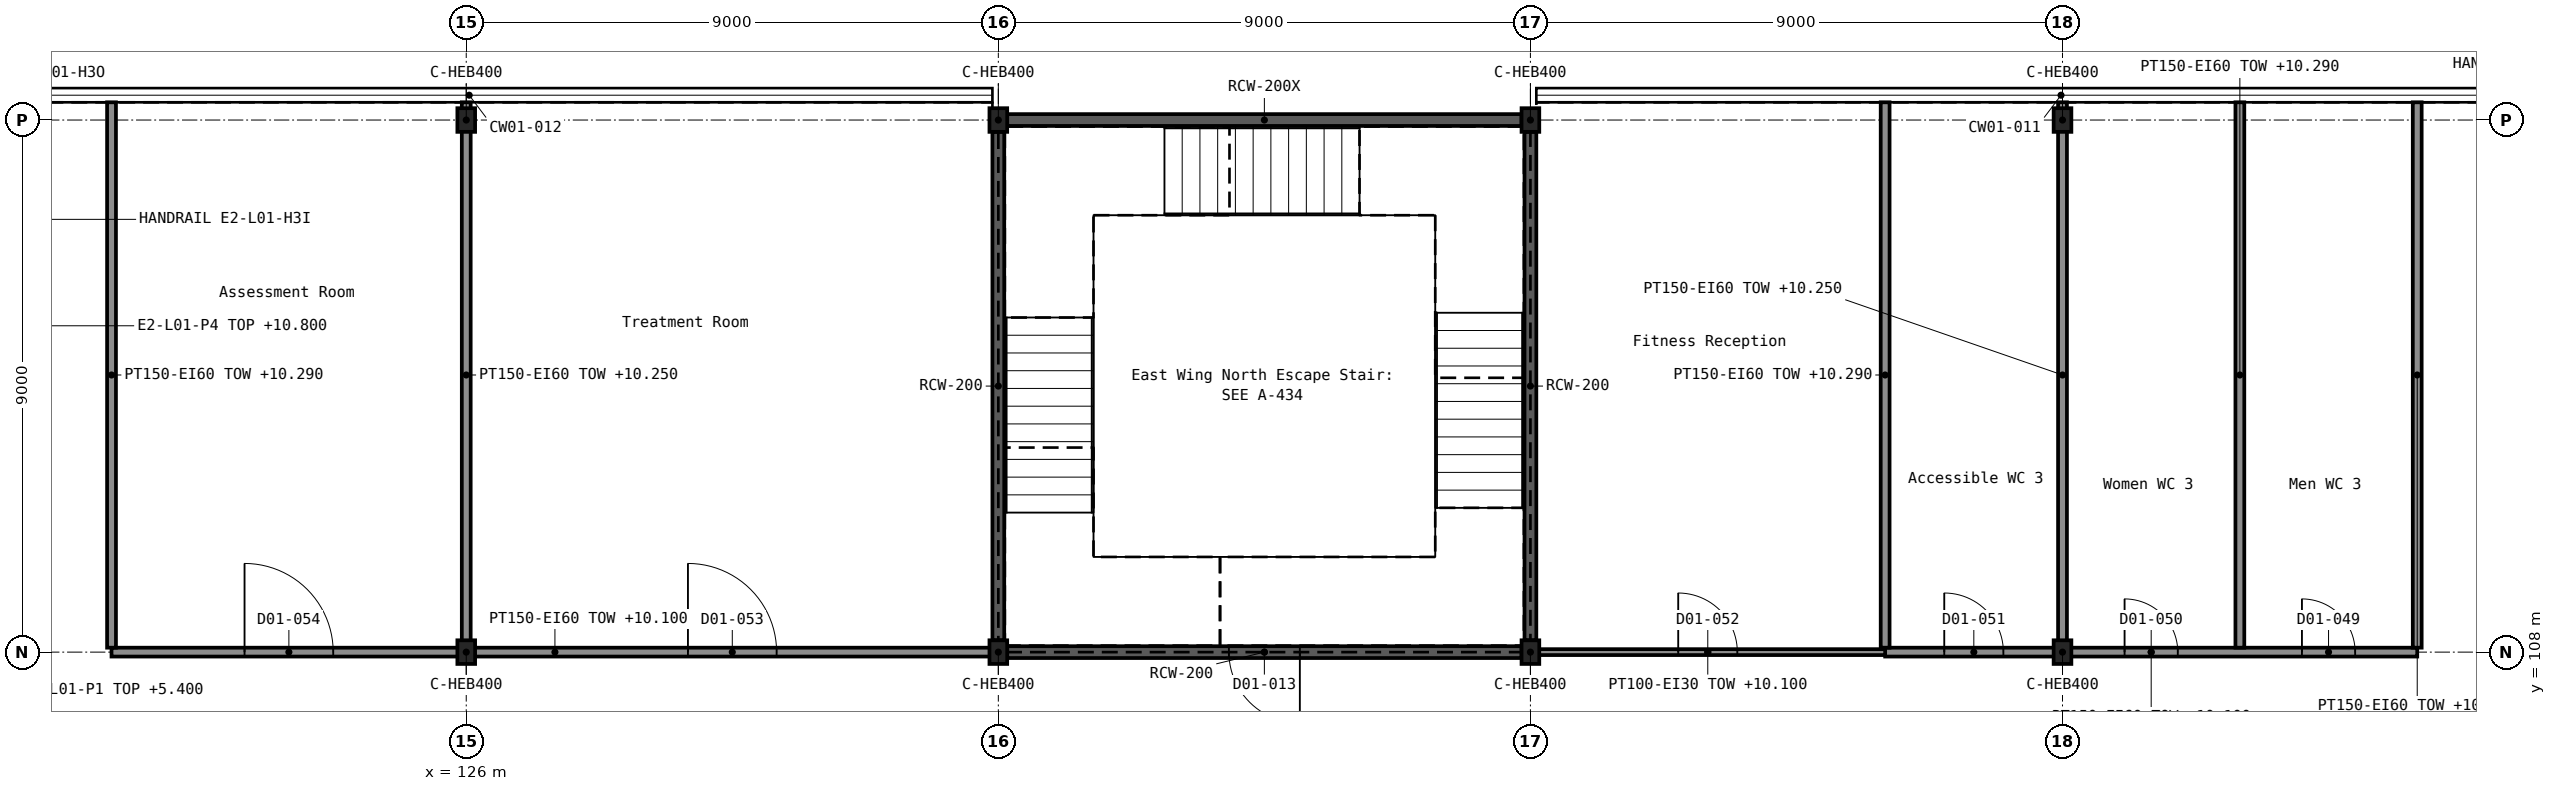
"""IFC4 building model, lengths in metres.
Left out: names, types, materials, properties, quantities, classifications, styles, units other than length and angle.
Written with IfcOpenShell. Run it as: python <this file> out.ifc"""

import sys

from ifc_helpers import new_model, si_unit, direction, frame, frame_2d, origin, origin_2d, place, context, subcontext, project, spatial, rectangle, i_section, extrude, element, fill, save


model = new_model("IFC4")
c1 = context("Model", 3, precision=1e-05, world=origin(), true_north=direction((0.0, 1.0)))
c2 = subcontext(c1, "Body", "Model", "MODEL_VIEW")
j1 = project(units=[si_unit("LENGTHUNIT", "METRE"), si_unit("PLANEANGLEUNIT", "RADIAN")], contexts=[c1])
p1 = place(None, origin())
s1 = spatial("IfcSite", under=j1, at=p1, CompositionType="ELEMENT")
p2 = place(p1, origin())
s2 = spatial("IfcBuilding", under=s1, at=p2, CompositionType="ELEMENT")
p3 = place(p2, frame((0.0, 0.0, 5.4)))
s3 = spatial("IfcBuildingStorey", under=s2, at=p3, CompositionType="ELEMENT", Elevation=5.4)
for number, where, z_axis, x_axis in (
    (1, (126.0, 108.0, 0.0), (0.0, 0.0, 1.0), (1.0, 0.0, 0.0)),
    (2, (135.0, 108.0, 0.0), (0.0, 0.0, 1.0), (1.0, 0.0, 0.0)),
    (3, (144.0, 108.0, 0.0), (0.0, 0.0, 1.0), (1.0, 0.0, 0.0)),
    (4, (153.0, 108.0, 0.0), (0.0, 0.0, 1.0), (1.0, 0.0, 0.0)),
    (5, (126.0, 117.0, 0.0), (0.0, 0.0, 1.0), (1.0, 0.0, 0.0)),
    (6, (135.0, 117.0, 0.0), (0.0, 0.0, 1.0), (1.0, 0.0, 0.0)),
    (7, (144.0, 117.0, 0.0), (0.0, 0.0, 1.0), (1.0, 0.0, 0.0)),
    (8, (153.0, 117.0, 0.0), (0.0, 0.0, 1.0), (1.0, 0.0, 0.0)),
):
    element("IfcColumn", number, at=place(p3, frame(where, z_axis=z_axis, x_axis=x_axis)), inside=s3, PredefinedType="COLUMN", context=c2, shape_type="SweptSolid", body=[
        extrude(i_section(OverallWidth=0.3, OverallDepth=0.4, WebThickness=0.013, FlangeThickness=0.024, FilletRadius=0.027, at=origin_2d()), origin(), (0.0, 0.0, 1.0), 5.4),
    ])
p4 = place(p3, frame((135.15, 108.0, 0.0), z_axis=(0.0, 0.0, 1.0), x_axis=(1.0, 0.0, 0.0)))
e9 = element("IfcWall", 9, at=p4, inside=s3, PredefinedType="SHEAR", context=c2, shape_type="SweptSolid", body=[
    extrude(rectangle(XDim=8.7, YDim=0.2, at=frame_2d((4.35, 0.0))), origin(), (0.0, 0.0, 1.0), 5.4),
])
p5 = place(p4, frame((3.75, 0.0, 0.0)))
e10 = element("IfcOpeningElement", 10, at=p5, cuts=e9, PredefinedType="OPENING", context=c2, shape_type="SweptSolid", body=[
    extrude(rectangle(XDim=1.2, YDim=2.1, at=frame_2d((0.6, 1.05))), frame((0.0, 0.111, 0.0), z_axis=(0.0, -1.0, 0.0), x_axis=(1.0, 0.0, 0.0)), (0.0, 0.0, 1.0), 0.222),
])
p6 = place(p3, frame((135.15, 117.0, 0.0), z_axis=(0.0, 0.0, 1.0), x_axis=(1.0, 0.0, 0.0)))
e11 = element("IfcWall", 11, at=p6, inside=s3, PredefinedType="SHEAR", context=c2, shape_type="SweptSolid", body=[
    extrude(rectangle(XDim=8.7, YDim=0.2, at=frame_2d((4.35, 0.0))), origin(), (0.0, 0.0, 1.0), 5.4),
])
for number, where, z_axis, x_axis in (
    (12, (135.0, 108.2, 0.0), (0.0, 0.0, 1.0), (0.0, 1.0, 0.0)),
    (13, (144.0, 108.2, 0.0), (0.0, 0.0, 1.0), (0.0, 1.0, 0.0)),
):
    element("IfcWall", number, at=place(p3, frame(where, z_axis=z_axis, x_axis=x_axis)), inside=s3, PredefinedType="SHEAR", context=c2, shape_type="SweptSolid", body=[
        extrude(rectangle(XDim=8.6, YDim=0.2, at=frame_2d((4.3, 0.0))), origin(), (0.0, 0.0, 1.0), 5.4),
    ])
p7 = place(p3, frame((120.0, 108.0, 0.0), z_axis=(0.0, 0.0, 1.0), x_axis=(1.0, 0.0, 0.0)))
e14 = element("IfcWall", 14, at=p7, inside=s3, PredefinedType="PARTITIONING", context=c2, shape_type="SweptSolid", body=[
    extrude(rectangle(XDim=15.0, YDim=0.15, at=frame_2d((7.5, 0.0))), origin(), (0.0, 0.0, 1.0), 4.7),
])
p8 = place(p7, frame((9.75, 0.0, 0.0)))
e15 = element("IfcOpeningElement", 15, at=p8, cuts=e14, PredefinedType="OPENING", context=c2, shape_type="SweptSolid", body=[
    extrude(rectangle(XDim=1.5, YDim=2.1, at=frame_2d((0.75, 1.05))), frame((0.0, 0.086, 0.0), z_axis=(0.0, -1.0, 0.0), x_axis=(1.0, 0.0, 0.0)), (0.0, 0.0, 1.0), 0.172),
])
p9 = place(p7, frame((2.25, 0.0, 0.0)))
e16 = element("IfcOpeningElement", 16, at=p9, cuts=e14, PredefinedType="OPENING", context=c2, shape_type="SweptSolid", body=[
    extrude(rectangle(XDim=1.5, YDim=2.1, at=frame_2d((0.75, 1.05))), frame((0.0, 0.086, 0.0), z_axis=(0.0, -1.0, 0.0), x_axis=(1.0, 0.0, 0.0)), (0.0, 0.0, 1.0), 0.172),
])
p10 = place(p3, frame((150.0, 108.0, 0.0), z_axis=(0.0, 0.0, 1.0), x_axis=(1.0, 0.0, 0.0)))
e17 = element("IfcWall", 17, at=p10, inside=s3, PredefinedType="PARTITIONING", context=c2, shape_type="SweptSolid", body=[
    extrude(rectangle(XDim=9.0, YDim=0.15, at=frame_2d((4.5, 0.0))), origin(), (0.0, 0.0, 1.0), 4.7),
])
p11 = place(p10, frame((7.05, 0.0, 0.0)))
e18 = element("IfcOpeningElement", 18, at=p11, cuts=e17, PredefinedType="OPENING", context=c2, shape_type="SweptSolid", body=[
    extrude(rectangle(XDim=0.9, YDim=2.1, at=frame_2d((0.45, 1.05))), frame((0.0, 0.086, 0.0), z_axis=(0.0, -1.0, 0.0), x_axis=(1.0, 0.0, 0.0)), (0.0, 0.0, 1.0), 0.172),
])
p12 = place(p10, frame((4.05, 0.0, 0.0)))
e19 = element("IfcOpeningElement", 19, at=p12, cuts=e17, PredefinedType="OPENING", context=c2, shape_type="SweptSolid", body=[
    extrude(rectangle(XDim=0.9, YDim=2.1, at=frame_2d((0.45, 1.05))), frame((0.0, 0.086, 0.0), z_axis=(0.0, -1.0, 0.0), x_axis=(1.0, 0.0, 0.0)), (0.0, 0.0, 1.0), 0.172),
])
p13 = place(p10, frame((1.0, 0.0, 0.0)))
e20 = element("IfcOpeningElement", 20, at=p13, cuts=e17, PredefinedType="OPENING", context=c2, shape_type="SweptSolid", body=[
    extrude(rectangle(XDim=1.0, YDim=2.1, at=frame_2d((0.5, 1.05))), frame((0.0, 0.086, 0.0), z_axis=(0.0, -1.0, 0.0), x_axis=(1.0, 0.0, 0.0)), (0.0, 0.0, 1.0), 0.172),
])
p14 = place(p3, frame((120.0, 108.075, 0.0), z_axis=(0.0, 0.0, 1.0), x_axis=(0.0, 1.0, 0.0)))
e21 = element("IfcWall", 21, at=p14, inside=s3, PredefinedType="PARTITIONING", context=c2, shape_type="SweptSolid", body=[
    extrude(rectangle(XDim=9.225, YDim=0.15, at=frame_2d((4.613, 0.0))), origin(), (0.0, 0.0, 1.0), 4.89),
])
p15 = place(p3, frame((126.0, 108.075, 0.0), z_axis=(0.0, 0.0, 1.0), x_axis=(0.0, 1.0, 0.0)))
e22 = element("IfcWall", 22, at=p15, inside=s3, PredefinedType="PARTITIONING", context=c2, shape_type="SweptSolid", body=[
    extrude(rectangle(XDim=9.225, YDim=0.15, at=frame_2d((4.613, 0.0))), origin(), (0.0, 0.0, 1.0), 4.85),
])
p16 = place(p3, frame((150.0, 108.075, 0.0), z_axis=(0.0, 0.0, 1.0), x_axis=(0.0, 1.0, 0.0)))
e23 = element("IfcWall", 23, at=p16, inside=s3, PredefinedType="PARTITIONING", context=c2, shape_type="SweptSolid", body=[
    extrude(rectangle(XDim=9.225, YDim=0.15, at=frame_2d((4.613, 0.0))), origin(), (0.0, 0.0, 1.0), 4.89),
])
p17 = place(p3, frame((153.0, 108.075, 0.0), z_axis=(0.0, 0.0, 1.0), x_axis=(0.0, 1.0, 0.0)))
e24 = element("IfcWall", 24, at=p17, inside=s3, PredefinedType="PARTITIONING", context=c2, shape_type="SweptSolid", body=[
    extrude(rectangle(XDim=9.225, YDim=0.15, at=frame_2d((4.613, 0.0))), origin(), (0.0, 0.0, 1.0), 4.85),
])
for number, where, z_axis, x_axis in (
    (25, (156.0, 108.075, 0.0), (0.0, 0.0, 1.0), (0.0, 1.0, 0.0)),
    (26, (159.0, 108.075, 0.0), (0.0, 0.0, 1.0), (0.0, 1.0, 0.0)),
):
    element("IfcWall", number, at=place(p3, frame(where, z_axis=z_axis, x_axis=x_axis)), inside=s3, PredefinedType="PARTITIONING", context=c2, shape_type="SweptSolid", body=[
        extrude(rectangle(XDim=9.225, YDim=0.15, at=frame_2d((4.613, 0.0))), origin(), (0.0, 0.0, 1.0), 4.89),
    ])
p18 = place(p3, frame((144.0, 108.0, 0.0), z_axis=(0.0, 0.0, 1.0), x_axis=(1.0, 0.0, 0.0)))
e27 = element("IfcWall", 27, at=p18, inside=s3, PredefinedType="PARTITIONING", context=c2, shape_type="SweptSolid", body=[
    extrude(rectangle(XDim=6.0, YDim=0.1, at=frame_2d((3.0, 0.0))), origin(), (0.0, 0.0, 1.0), 4.7),
])
p19 = place(p18, frame((2.5, 0.0, 0.0)))
e28 = element("IfcOpeningElement", 28, at=p19, cuts=e27, PredefinedType="OPENING", context=c2, shape_type="SweptSolid", body=[
    extrude(rectangle(XDim=1.0, YDim=2.4, at=frame_2d((0.5, 1.2))), frame((0.0, 0.061, 0.0), z_axis=(0.0, -1.0, 0.0), x_axis=(1.0, 0.0, 0.0)), (0.0, 0.0, 1.0), 0.122),
])
p20 = place(p5, frame((1.2, 0.0, 0.0), z_axis=(0.0, 0.0, 1.0), x_axis=(-1.0, 0.0, 0.0)))
e29 = element("IfcDoor", 29, at=p20, inside=s3, OperationType="SINGLE_SWING_LEFT", PredefinedType="DOOR", context=c2, shape_type="SweptSolid", body=[
    extrude(rectangle(XDim=1.2, YDim=2.1, at=frame_2d((0.6, 1.05))), frame((0.0, 0.025, 0.0), z_axis=(0.0, -1.0, 0.0), x_axis=(1.0, 0.0, 0.0)), (0.0, 0.0, 1.0), 0.05),
])
fill(e10, e29)
p21 = place(p11, origin())
e30 = element("IfcDoor", 30, at=p21, inside=s3, OperationType="SINGLE_SWING_LEFT", PredefinedType="DOOR", context=c2, shape_type="SweptSolid", body=[
    extrude(rectangle(XDim=0.9, YDim=2.1, at=frame_2d((0.45, 1.05))), frame((0.0, 0.025, 0.0), z_axis=(0.0, -1.0, 0.0), x_axis=(1.0, 0.0, 0.0)), (0.0, 0.0, 1.0), 0.05),
])
fill(e18, e30)
p22 = place(p12, origin())
e31 = element("IfcDoor", 31, at=p22, inside=s3, OperationType="SINGLE_SWING_LEFT", PredefinedType="DOOR", context=c2, shape_type="SweptSolid", body=[
    extrude(rectangle(XDim=0.9, YDim=2.1, at=frame_2d((0.45, 1.05))), frame((0.0, 0.025, 0.0), z_axis=(0.0, -1.0, 0.0), x_axis=(1.0, 0.0, 0.0)), (0.0, 0.0, 1.0), 0.05),
])
fill(e19, e31)
p23 = place(p13, origin())
e32 = element("IfcDoor", 32, at=p23, inside=s3, OperationType="SINGLE_SWING_LEFT", PredefinedType="DOOR", context=c2, shape_type="SweptSolid", body=[
    extrude(rectangle(XDim=1.0, YDim=2.1, at=frame_2d((0.5, 1.05))), frame((0.0, 0.025, 0.0), z_axis=(0.0, -1.0, 0.0), x_axis=(1.0, 0.0, 0.0)), (0.0, 0.0, 1.0), 0.05),
])
fill(e20, e32)
p24 = place(p19, origin())
e33 = element("IfcDoor", 33, at=p24, inside=s3, OperationType="SINGLE_SWING_LEFT", PredefinedType="DOOR", context=c2, shape_type="SweptSolid", body=[
    extrude(rectangle(XDim=1.0, YDim=2.4, at=frame_2d((0.5, 1.2))), frame((0.0, 0.025, 0.0), z_axis=(0.0, -1.0, 0.0), x_axis=(1.0, 0.0, 0.0)), (0.0, 0.0, 1.0), 0.05),
])
fill(e28, e33)
p25 = place(p8, origin())
e34 = element("IfcDoor", 34, at=p25, inside=s3, OperationType="DOUBLE_DOOR_SINGLE_SWING", PredefinedType="DOOR", context=c2, shape_type="SweptSolid", body=[
    extrude(rectangle(XDim=1.5, YDim=2.1, at=frame_2d((0.75, 1.05))), frame((0.0, 0.025, 0.0), z_axis=(0.0, -1.0, 0.0), x_axis=(1.0, 0.0, 0.0)), (0.0, 0.0, 1.0), 0.05),
])
fill(e15, e34)
p26 = place(p9, origin())
e35 = element("IfcDoor", 35, at=p26, inside=s3, OperationType="DOUBLE_DOOR_SINGLE_SWING", PredefinedType="DOOR", context=c2, shape_type="SweptSolid", body=[
    extrude(rectangle(XDim=1.5, YDim=2.1, at=frame_2d((0.75, 1.05))), frame((0.0, 0.025, 0.0), z_axis=(0.0, -1.0, 0.0), x_axis=(1.0, 0.0, 0.0)), (0.0, 0.0, 1.0), 0.05),
])
fill(e16, e35)
save(model, sys.argv[1])
